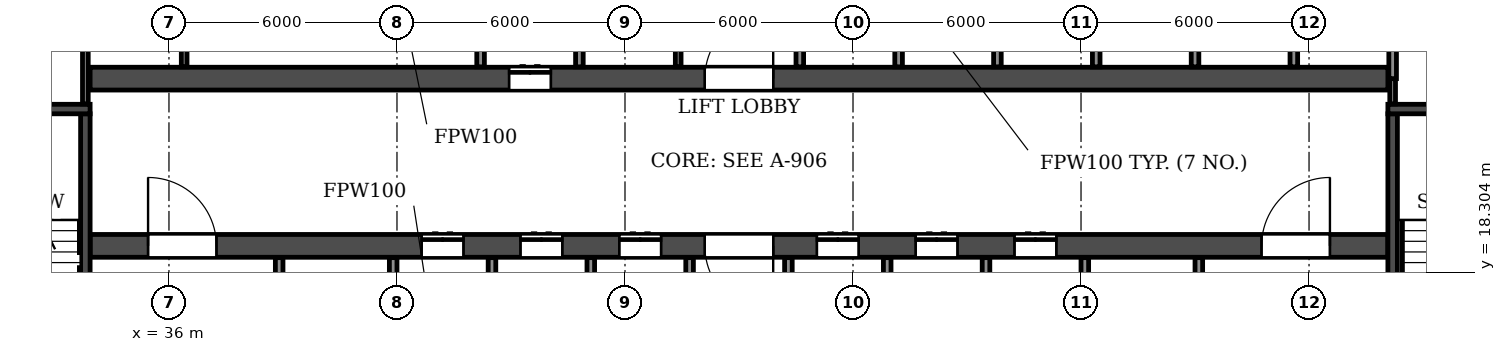
"""IFC4 building model, lengths in metres.
Left out: names, types, materials, properties, quantities, classifications, styles, units other than length and angle.
Written with IfcOpenShell. Run it as: python <this file> out.ifc"""

import sys

from ifc_helpers import new_model, si_unit, direction, frame, frame_2d, origin, place, context, subcontext, project, spatial, rectangle, extrude, element, fill, save


model = new_model("IFC4")
c1 = context("Model", 3, precision=1e-05, world=origin(), true_north=direction((0.0, 1.0)))
c2 = subcontext(c1, "Body", "Model", "MODEL_VIEW")
j1 = project(units=[si_unit("LENGTHUNIT", "METRE"), si_unit("PLANEANGLEUNIT", "RADIAN")], contexts=[c1])
p1 = place(None, origin())
s1 = spatial("IfcSite", under=j1, at=p1, CompositionType="ELEMENT")
p2 = place(p1, origin())
s2 = spatial("IfcBuilding", under=s1, at=p2, CompositionType="ELEMENT")
p3 = place(p2, frame((0.0, 0.0, 23.4)))
s3 = spatial("IfcBuildingStorey", under=s2, at=p3, CompositionType="ELEMENT", Elevation=23.4)
p4 = place(p3, frame((33.925, 19.0, 0.0), z_axis=(0.0, 0.0, 1.0), x_axis=(1.0, 0.0, 0.0)))
e1 = element("IfcWall", 1, at=p4, inside=s3, PredefinedType="SOLIDWALL", context=c2, shape_type="SweptSolid", body=[
    extrude(rectangle(XDim=34.15, YDim=0.6, at=frame_2d((17.075, 0.0))), origin(), (0.0, 0.0, 1.0), 3.05),
])
p5 = place(p4, frame((16.175, 0.0, 0.0)))
e2 = element("IfcOpeningElement", 2, at=p5, cuts=e1, PredefinedType="OPENING", context=c2, shape_type="SweptSolid", body=[
    extrude(rectangle(XDim=1.8, YDim=2.1, at=frame_2d((0.9, 1.05))), frame((0.0, 0.31, 0.0), z_axis=(0.0, -1.0, 0.0), x_axis=(1.0, 0.0, 0.0)), (0.0, 0.0, 1.0), 0.62),
])
p6 = place(p4, frame((1.525, 0.0, 0.0)))
e3 = element("IfcOpeningElement", 3, at=p6, cuts=e1, PredefinedType="OPENING", context=c2, shape_type="SweptSolid", body=[
    extrude(rectangle(XDim=1.8, YDim=2.1, at=frame_2d((0.9, 1.05))), frame((0.0, 0.31, 0.0), z_axis=(0.0, -1.0, 0.0), x_axis=(1.0, 0.0, 0.0)), (0.0, 0.0, 1.0), 0.62),
])
p7 = place(p4, frame((8.725, 0.0, 0.0)))
e4 = element("IfcOpeningElement", 4, at=p7, cuts=e1, PredefinedType="OPENING", context=c2, shape_type="SweptSolid", body=[
    extrude(rectangle(XDim=1.1, YDim=2.1, at=frame_2d((0.55, 1.05))), frame((0.0, 0.31, 0.0), z_axis=(0.0, -1.0, 0.0), x_axis=(1.0, 0.0, 0.0)), (0.0, 0.0, 1.0), 0.62),
])
p8 = place(p4, frame((11.325, 0.0, 0.0)))
e5 = element("IfcOpeningElement", 5, at=p8, cuts=e1, PredefinedType="OPENING", context=c2, shape_type="SweptSolid", body=[
    extrude(rectangle(XDim=1.1, YDim=2.1, at=frame_2d((0.55, 1.05))), frame((0.0, 0.31, 0.0), z_axis=(0.0, -1.0, 0.0), x_axis=(1.0, 0.0, 0.0)), (0.0, 0.0, 1.0), 0.62),
])
p9 = place(p4, frame((13.925, 0.0, 0.0)))
e6 = element("IfcOpeningElement", 6, at=p9, cuts=e1, PredefinedType="OPENING", context=c2, shape_type="SweptSolid", body=[
    extrude(rectangle(XDim=1.1, YDim=2.1, at=frame_2d((0.55, 1.05))), frame((0.0, 0.31, 0.0), z_axis=(0.0, -1.0, 0.0), x_axis=(1.0, 0.0, 0.0)), (0.0, 0.0, 1.0), 0.62),
])
p10 = place(p4, frame((19.125, 0.0, 0.0)))
e7 = element("IfcOpeningElement", 7, at=p10, cuts=e1, PredefinedType="OPENING", context=c2, shape_type="SweptSolid", body=[
    extrude(rectangle(XDim=1.1, YDim=2.1, at=frame_2d((0.55, 1.05))), frame((0.0, 0.31, 0.0), z_axis=(0.0, -1.0, 0.0), x_axis=(1.0, 0.0, 0.0)), (0.0, 0.0, 1.0), 0.62),
])
p11 = place(p4, frame((21.725, 0.0, 0.0)))
e8 = element("IfcOpeningElement", 8, at=p11, cuts=e1, PredefinedType="OPENING", context=c2, shape_type="SweptSolid", body=[
    extrude(rectangle(XDim=1.1, YDim=2.1, at=frame_2d((0.55, 1.05))), frame((0.0, 0.31, 0.0), z_axis=(0.0, -1.0, 0.0), x_axis=(1.0, 0.0, 0.0)), (0.0, 0.0, 1.0), 0.62),
])
p12 = place(p4, frame((24.325, 0.0, 0.0)))
e9 = element("IfcOpeningElement", 9, at=p12, cuts=e1, PredefinedType="OPENING", context=c2, shape_type="SweptSolid", body=[
    extrude(rectangle(XDim=1.1, YDim=2.1, at=frame_2d((0.55, 1.05))), frame((0.0, 0.31, 0.0), z_axis=(0.0, -1.0, 0.0), x_axis=(1.0, 0.0, 0.0)), (0.0, 0.0, 1.0), 0.62),
])
p13 = place(p4, frame((30.825, 0.0, 0.0)))
e10 = element("IfcOpeningElement", 10, at=p13, cuts=e1, PredefinedType="OPENING", context=c2, shape_type="SweptSolid", body=[
    extrude(rectangle(XDim=1.8, YDim=2.1, at=frame_2d((0.9, 1.05))), frame((0.0, 0.31, 0.0), z_axis=(0.0, -1.0, 0.0), x_axis=(1.0, 0.0, 0.0)), (0.0, 0.0, 1.0), 0.62),
])
p14 = place(p3, frame((33.925, 23.4, 0.0), z_axis=(0.0, 0.0, 1.0), x_axis=(1.0, 0.0, 0.0)))
e11 = element("IfcWall", 11, at=p14, inside=s3, PredefinedType="SOLIDWALL", context=c2, shape_type="SweptSolid", body=[
    extrude(rectangle(XDim=34.15, YDim=0.6, at=frame_2d((17.075, 0.0))), origin(), (0.0, 0.0, 1.0), 3.05),
])
p15 = place(p14, frame((16.175, 0.0, 0.0)))
e12 = element("IfcOpeningElement", 12, at=p15, cuts=e11, PredefinedType="OPENING", context=c2, shape_type="SweptSolid", body=[
    extrude(rectangle(XDim=1.8, YDim=2.1, at=frame_2d((0.9, 1.05))), frame((0.0, 0.31, 0.0), z_axis=(0.0, -1.0, 0.0), x_axis=(1.0, 0.0, 0.0)), (0.0, 0.0, 1.0), 0.62),
])
p16 = place(p14, frame((11.025, 0.0, 0.0)))
e13 = element("IfcOpeningElement", 13, at=p16, cuts=e11, PredefinedType="OPENING", context=c2, shape_type="SweptSolid", body=[
    extrude(rectangle(XDim=1.1, YDim=2.1, at=frame_2d((0.55, 1.05))), frame((0.0, 0.31, 0.0), z_axis=(0.0, -1.0, 0.0), x_axis=(1.0, 0.0, 0.0)), (0.0, 0.0, 1.0), 0.62),
])
p17 = place(p3, frame((33.8, 14.9, 0.0), z_axis=(0.0, 0.0, 1.0), x_axis=(0.0, 1.0, 0.0)))
e14 = element("IfcWall", 14, at=p17, inside=s3, PredefinedType="SOLIDWALL", context=c2, shape_type="SweptSolid", body=[
    extrude(rectangle(XDim=7.575, YDim=0.25, at=frame_2d((3.788, 0.0))), origin(), (0.0, 0.0, 1.0), 3.05),
])
p18 = place(p17, frame((0.4, 0.0, 0.0)))
e15 = element("IfcOpeningElement", 15, at=p18, cuts=e14, PredefinedType="OPENING", context=c2, shape_type="SweptSolid", body=[
    extrude(rectangle(XDim=1.0, YDim=2.1, at=frame_2d((0.5, 1.05))), frame((0.0, 0.135, 0.0), z_axis=(0.0, -1.0, 0.0), x_axis=(1.0, 0.0, 0.0)), (0.0, 0.0, 1.0), 0.27),
])
p19 = place(p3, frame((29.875, 22.6, 0.0), z_axis=(0.0, 0.0, 1.0), x_axis=(1.0, 0.0, 0.0)))
e16 = element("IfcWall", 16, at=p19, inside=s3, PredefinedType="SOLIDWALL", context=c2, shape_type="SweptSolid", body=[
    extrude(rectangle(XDim=4.05, YDim=0.25, at=frame_2d((2.025, 0.0))), origin(), (0.0, 0.0, 1.0), 3.05),
])
p20 = place(p3, frame((68.2, 14.9, 0.0), z_axis=(0.0, 0.0, 1.0), x_axis=(0.0, 1.0, 0.0)))
e17 = element("IfcWall", 17, at=p20, inside=s3, PredefinedType="SOLIDWALL", context=c2, shape_type="SweptSolid", body=[
    extrude(rectangle(XDim=7.575, YDim=0.25, at=frame_2d((3.788, 0.0))), origin(), (0.0, 0.0, 1.0), 3.05),
])
p21 = place(p20, frame((0.4, 0.0, 0.0)))
e18 = element("IfcOpeningElement", 18, at=p21, cuts=e17, PredefinedType="OPENING", context=c2, shape_type="SweptSolid", body=[
    extrude(rectangle(XDim=1.0, YDim=2.1, at=frame_2d((0.5, 1.05))), frame((0.0, 0.135, 0.0), z_axis=(0.0, -1.0, 0.0), x_axis=(1.0, 0.0, 0.0)), (0.0, 0.0, 1.0), 0.27),
])
p22 = place(p3, frame((68.075, 22.6, 0.0), z_axis=(0.0, 0.0, 1.0), x_axis=(1.0, 0.0, 0.0)))
e19 = element("IfcWall", 19, at=p22, inside=s3, PredefinedType="SOLIDWALL", context=c2, shape_type="SweptSolid", body=[
    extrude(rectangle(XDim=4.05, YDim=0.25, at=frame_2d((2.025, 0.0))), origin(), (0.0, 0.0, 1.0), 3.05),
])
for number, where, z_axis, x_axis in (
    (20, (49.4, 23.71, 0.0), (0.0, 0.0, 1.0), (0.0, 1.0, 0.0)),
    (21, (36.4, 23.71, 0.0), (0.0, 0.0, 1.0), (0.0, 1.0, 0.0)),
):
    element("IfcWall", number, at=place(p3, frame(where, z_axis=z_axis, x_axis=x_axis)), inside=s3, PredefinedType="PARTITIONING", context=c2, shape_type="SweptSolid", body=[
        extrude(rectangle(XDim=3.78, YDim=0.15, at=frame_2d((1.89, 0.0))), origin(), (0.0, 0.0, 1.0), 3.05),
    ])
p23 = place(p3, frame((33.8, 22.735, 0.0), z_axis=(0.0, 0.0, 1.0), x_axis=(0.0, 1.0, 0.0)))
e22 = element("IfcWall", 22, at=p23, inside=s3, PredefinedType="PARTITIONING", context=c2, shape_type="SweptSolid", body=[
    extrude(rectangle(XDim=4.755, YDim=0.15, at=frame_2d((2.377, 0.0))), origin(), (0.0, 0.0, 1.0), 3.05),
])
p24 = place(p3, frame((68.2, 22.735, 0.0), z_axis=(0.0, 0.0, 1.0), x_axis=(0.0, 1.0, 0.0)))
e23 = element("IfcWall", 23, at=p24, inside=s3, PredefinedType="PARTITIONING", context=c2, shape_type="SweptSolid", body=[
    extrude(rectangle(XDim=0.665, YDim=0.15, at=frame_2d((0.333, 0.0))), origin(), (0.0, 0.0, 1.0), 3.05),
])
p25 = place(p3, frame((38.9, 14.91, 0.0), z_axis=(0.0, 0.0, 1.0), x_axis=(0.0, 1.0, 0.0)))
e24 = element("IfcWall", 24, at=p25, inside=s3, PredefinedType="PARTITIONING", context=c2, shape_type="SweptSolid", body=[
    extrude(rectangle(XDim=3.78, YDim=0.2, at=frame_2d((1.89, 0.0))), origin(), (0.0, 0.0, 1.0), 3.05),
])
p26 = place(p25, frame((1.34, 0.0, 0.0)))
e25 = element("IfcOpeningElement", 25, at=p26, cuts=e24, PredefinedType="OPENING", context=c2, shape_type="SweptSolid", body=[
    extrude(rectangle(XDim=1.1, YDim=2.1, at=frame_2d((0.55, 1.05))), frame((0.0, 0.11, 0.0), z_axis=(0.0, -1.0, 0.0), x_axis=(1.0, 0.0, 0.0)), (0.0, 0.0, 1.0), 0.22),
])
for number, where, z_axis, x_axis in (
    (26, (41.9, 14.91, 0.0), (0.0, 0.0, 1.0), (0.0, 1.0, 0.0)),
    (27, (44.2, 23.71, 0.0), (0.0, 0.0, 1.0), (0.0, 1.0, 0.0)),
):
    element("IfcWall", number, at=place(p3, frame(where, z_axis=z_axis, x_axis=x_axis)), inside=s3, PredefinedType="PARTITIONING", context=c2, shape_type="SweptSolid", body=[
        extrude(rectangle(XDim=3.78, YDim=0.2, at=frame_2d((1.89, 0.0))), origin(), (0.0, 0.0, 1.0), 3.05),
    ])
p27 = place(p3, frame((44.5, 16.3, 0.0), z_axis=(0.0, 0.0, 1.0), x_axis=(0.0, 1.0, 0.0)))
e28 = element("IfcWall", 28, at=p27, inside=s3, PredefinedType="PARTITIONING", context=c2, shape_type="SweptSolid", body=[
    extrude(rectangle(XDim=2.39, YDim=0.2, at=frame_2d((1.195, 0.0))), origin(), (0.0, 0.0, 1.0), 3.05),
])
p28 = place(p3, frame((46.8, 23.71, 0.0), z_axis=(0.0, 0.0, 1.0), x_axis=(0.0, 1.0, 0.0)))
e29 = element("IfcWall", 29, at=p28, inside=s3, PredefinedType="PARTITIONING", context=c2, shape_type="SweptSolid", body=[
    extrude(rectangle(XDim=3.78, YDim=0.2, at=frame_2d((1.89, 0.0))), origin(), (0.0, 0.0, 1.0), 3.05),
])
for number, where, z_axis, x_axis in (
    (30, (47.1, 16.3, 0.0), (0.0, 0.0, 1.0), (0.0, 1.0, 0.0)),
    (31, (49.7, 16.3, 0.0), (0.0, 0.0, 1.0), (0.0, 1.0, 0.0)),
    (32, (52.3, 16.3, 0.0), (0.0, 0.0, 1.0), (0.0, 1.0, 0.0)),
):
    element("IfcWall", number, at=place(p3, frame(where, z_axis=z_axis, x_axis=x_axis)), inside=s3, PredefinedType="PARTITIONING", context=c2, shape_type="SweptSolid", body=[
        extrude(rectangle(XDim=2.39, YDim=0.2, at=frame_2d((1.195, 0.0))), origin(), (0.0, 0.0, 1.0), 3.05),
    ])
p29 = place(p3, frame((52.6, 23.71, 0.0), z_axis=(0.0, 0.0, 1.0), x_axis=(0.0, 1.0, 0.0)))
e33 = element("IfcWall", 33, at=p29, inside=s3, PredefinedType="PARTITIONING", context=c2, shape_type="SweptSolid", body=[
    extrude(rectangle(XDim=2.39, YDim=0.2, at=frame_2d((1.195, 0.0))), origin(), (0.0, 0.0, 1.0), 3.05),
])
p30 = place(p3, frame((54.9, 16.3, 0.0), z_axis=(0.0, 0.0, 1.0), x_axis=(0.0, 1.0, 0.0)))
e34 = element("IfcWall", 34, at=p30, inside=s3, PredefinedType="PARTITIONING", context=c2, shape_type="SweptSolid", body=[
    extrude(rectangle(XDim=2.39, YDim=0.2, at=frame_2d((1.195, 0.0))), origin(), (0.0, 0.0, 1.0), 3.05),
])
p31 = place(p3, frame((55.2, 23.71, 0.0), z_axis=(0.0, 0.0, 1.0), x_axis=(0.0, 1.0, 0.0)))
e35 = element("IfcWall", 35, at=p31, inside=s3, PredefinedType="PARTITIONING", context=c2, shape_type="SweptSolid", body=[
    extrude(rectangle(XDim=2.39, YDim=0.2, at=frame_2d((1.195, 0.0))), origin(), (0.0, 0.0, 1.0), 3.05),
])
p32 = place(p3, frame((57.5, 16.3, 0.0), z_axis=(0.0, 0.0, 1.0), x_axis=(0.0, 1.0, 0.0)))
e36 = element("IfcWall", 36, at=p32, inside=s3, PredefinedType="PARTITIONING", context=c2, shape_type="SweptSolid", body=[
    extrude(rectangle(XDim=2.39, YDim=0.2, at=frame_2d((1.195, 0.0))), origin(), (0.0, 0.0, 1.0), 3.05),
])
p33 = place(p3, frame((57.8, 23.71, 0.0), z_axis=(0.0, 0.0, 1.0), x_axis=(0.0, 1.0, 0.0)))
e37 = element("IfcWall", 37, at=p33, inside=s3, PredefinedType="PARTITIONING", context=c2, shape_type="SweptSolid", body=[
    extrude(rectangle(XDim=2.39, YDim=0.2, at=frame_2d((1.195, 0.0))), origin(), (0.0, 0.0, 1.0), 3.05),
])
p34 = place(p3, frame((60.1, 14.91, 0.0), z_axis=(0.0, 0.0, 1.0), x_axis=(0.0, 1.0, 0.0)))
e38 = element("IfcWall", 38, at=p34, inside=s3, PredefinedType="PARTITIONING", context=c2, shape_type="SweptSolid", body=[
    extrude(rectangle(XDim=3.78, YDim=0.2, at=frame_2d((1.89, 0.0))), origin(), (0.0, 0.0, 1.0), 3.05),
])
for number, where, z_axis, x_axis in (
    (39, (60.4, 23.71, 0.0), (0.0, 0.0, 1.0), (0.0, 1.0, 0.0)),
    (40, (63.0, 23.71, 0.0), (0.0, 0.0, 1.0), (0.0, 1.0, 0.0)),
):
    element("IfcWall", number, at=place(p3, frame(where, z_axis=z_axis, x_axis=x_axis)), inside=s3, PredefinedType="PARTITIONING", context=c2, shape_type="SweptSolid", body=[
        extrude(rectangle(XDim=2.39, YDim=0.2, at=frame_2d((1.195, 0.0))), origin(), (0.0, 0.0, 1.0), 3.05),
    ])
p35 = place(p3, frame((63.1, 14.91, 0.0), z_axis=(0.0, 0.0, 1.0), x_axis=(0.0, 1.0, 0.0)))
e41 = element("IfcWall", 41, at=p35, inside=s3, PredefinedType="PARTITIONING", context=c2, shape_type="SweptSolid", body=[
    extrude(rectangle(XDim=3.78, YDim=0.2, at=frame_2d((1.89, 0.0))), origin(), (0.0, 0.0, 1.0), 3.05),
])
p36 = place(p35, frame((1.34, 0.0, 0.0)))
e42 = element("IfcOpeningElement", 42, at=p36, cuts=e41, PredefinedType="OPENING", context=c2, shape_type="SweptSolid", body=[
    extrude(rectangle(XDim=1.1, YDim=2.1, at=frame_2d((0.55, 1.05))), frame((0.0, 0.11, 0.0), z_axis=(0.0, -1.0, 0.0), x_axis=(1.0, 0.0, 0.0)), (0.0, 0.0, 1.0), 0.22),
])
p37 = place(p3, frame((65.6, 23.71, 0.0), z_axis=(0.0, 0.0, 1.0), x_axis=(0.0, 1.0, 0.0)))
e43 = element("IfcWall", 43, at=p37, inside=s3, PredefinedType="PARTITIONING", context=c2, shape_type="SweptSolid", body=[
    extrude(rectangle(XDim=2.39, YDim=0.2, at=frame_2d((1.195, 0.0))), origin(), (0.0, 0.0, 1.0), 3.05),
])
p38 = place(p3, frame((68.2, 23.4, 0.0), z_axis=(0.0, 0.0, 1.0), x_axis=(0.0, 1.0, 0.0)))
e44 = element("IfcWall", 44, at=p38, inside=s3, PredefinedType="PARTITIONING", context=c2, shape_type="SweptSolid", body=[
    extrude(rectangle(XDim=2.7, YDim=0.2, at=frame_2d((1.35, 0.0))), origin(), (0.0, 0.0, 1.0), 3.05),
])
p39 = place(p15, origin())
e45 = element("IfcDoor", 45, at=p39, inside=s3, OperationType="DOUBLE_DOOR_SINGLE_SWING", PredefinedType="DOOR", context=c2, shape_type="SweptSolid", body=[
    extrude(rectangle(XDim=1.8, YDim=2.1, at=frame_2d((0.9, 1.05))), frame((0.0, 0.025, 0.0), z_axis=(0.0, -1.0, 0.0), x_axis=(1.0, 0.0, 0.0)), (0.0, 0.0, 1.0), 0.05),
])
fill(e12, e45)
p40 = place(p5, frame((1.8, 0.0, 0.0), z_axis=(0.0, 0.0, 1.0), x_axis=(-1.0, 0.0, 0.0)))
e46 = element("IfcDoor", 46, at=p40, inside=s3, OperationType="DOUBLE_DOOR_SINGLE_SWING", PredefinedType="DOOR", context=c2, shape_type="SweptSolid", body=[
    extrude(rectangle(XDim=1.8, YDim=2.1, at=frame_2d((0.9, 1.05))), frame((0.0, 0.025, 0.0), z_axis=(0.0, -1.0, 0.0), x_axis=(1.0, 0.0, 0.0)), (0.0, 0.0, 1.0), 0.05),
])
fill(e2, e46)
p41 = place(p6, origin())
e47 = element("IfcDoor", 47, at=p41, inside=s3, OperationType="DOUBLE_DOOR_SINGLE_SWING", PredefinedType="DOOR", context=c2, shape_type="SweptSolid", body=[
    extrude(rectangle(XDim=1.8, YDim=2.1, at=frame_2d((0.9, 1.05))), frame((0.0, 0.025, 0.0), z_axis=(0.0, -1.0, 0.0), x_axis=(1.0, 0.0, 0.0)), (0.0, 0.0, 1.0), 0.05),
])
fill(e3, e47)
p42 = place(p7, origin())
e48 = element("IfcDoor", 48, at=p42, inside=s3, OperationType="DOUBLE_DOOR_SLIDING", PredefinedType="DOOR", context=c2, shape_type="SweptSolid", body=[
    extrude(rectangle(XDim=1.1, YDim=2.1, at=frame_2d((0.55, 1.05))), frame((0.0, 0.025, 0.0), z_axis=(0.0, -1.0, 0.0), x_axis=(1.0, 0.0, 0.0)), (0.0, 0.0, 1.0), 0.05),
])
fill(e4, e48)
p43 = place(p16, origin())
e49 = element("IfcDoor", 49, at=p43, inside=s3, OperationType="DOUBLE_DOOR_SLIDING", PredefinedType="DOOR", context=c2, shape_type="SweptSolid", body=[
    extrude(rectangle(XDim=1.1, YDim=2.1, at=frame_2d((0.55, 1.05))), frame((0.0, 0.025, 0.0), z_axis=(0.0, -1.0, 0.0), x_axis=(1.0, 0.0, 0.0)), (0.0, 0.0, 1.0), 0.05),
])
fill(e13, e49)
p44 = place(p8, origin())
e50 = element("IfcDoor", 50, at=p44, inside=s3, OperationType="DOUBLE_DOOR_SLIDING", PredefinedType="DOOR", context=c2, shape_type="SweptSolid", body=[
    extrude(rectangle(XDim=1.1, YDim=2.1, at=frame_2d((0.55, 1.05))), frame((0.0, 0.025, 0.0), z_axis=(0.0, -1.0, 0.0), x_axis=(1.0, 0.0, 0.0)), (0.0, 0.0, 1.0), 0.05),
])
fill(e5, e50)
p45 = place(p9, origin())
e51 = element("IfcDoor", 51, at=p45, inside=s3, OperationType="DOUBLE_DOOR_SLIDING", PredefinedType="DOOR", context=c2, shape_type="SweptSolid", body=[
    extrude(rectangle(XDim=1.1, YDim=2.1, at=frame_2d((0.55, 1.05))), frame((0.0, 0.025, 0.0), z_axis=(0.0, -1.0, 0.0), x_axis=(1.0, 0.0, 0.0)), (0.0, 0.0, 1.0), 0.05),
])
fill(e6, e51)
p46 = place(p10, origin())
e52 = element("IfcDoor", 52, at=p46, inside=s3, OperationType="DOUBLE_DOOR_SLIDING", PredefinedType="DOOR", context=c2, shape_type="SweptSolid", body=[
    extrude(rectangle(XDim=1.1, YDim=2.1, at=frame_2d((0.55, 1.05))), frame((0.0, 0.025, 0.0), z_axis=(0.0, -1.0, 0.0), x_axis=(1.0, 0.0, 0.0)), (0.0, 0.0, 1.0), 0.05),
])
fill(e7, e52)
p47 = place(p11, origin())
e53 = element("IfcDoor", 53, at=p47, inside=s3, OperationType="DOUBLE_DOOR_SLIDING", PredefinedType="DOOR", context=c2, shape_type="SweptSolid", body=[
    extrude(rectangle(XDim=1.1, YDim=2.1, at=frame_2d((0.55, 1.05))), frame((0.0, 0.025, 0.0), z_axis=(0.0, -1.0, 0.0), x_axis=(1.0, 0.0, 0.0)), (0.0, 0.0, 1.0), 0.05),
])
fill(e8, e53)
p48 = place(p12, origin())
e54 = element("IfcDoor", 54, at=p48, inside=s3, OperationType="DOUBLE_DOOR_SLIDING", PredefinedType="DOOR", context=c2, shape_type="SweptSolid", body=[
    extrude(rectangle(XDim=1.1, YDim=2.1, at=frame_2d((0.55, 1.05))), frame((0.0, 0.025, 0.0), z_axis=(0.0, -1.0, 0.0), x_axis=(1.0, 0.0, 0.0)), (0.0, 0.0, 1.0), 0.05),
])
fill(e9, e54)
p49 = place(p13, origin())
e55 = element("IfcDoor", 55, at=p49, inside=s3, OperationType="DOUBLE_DOOR_SINGLE_SWING", PredefinedType="DOOR", context=c2, shape_type="SweptSolid", body=[
    extrude(rectangle(XDim=1.8, YDim=2.1, at=frame_2d((0.9, 1.05))), frame((0.0, 0.025, 0.0), z_axis=(0.0, -1.0, 0.0), x_axis=(1.0, 0.0, 0.0)), (0.0, 0.0, 1.0), 0.05),
])
fill(e10, e55)
save(model, sys.argv[1])
